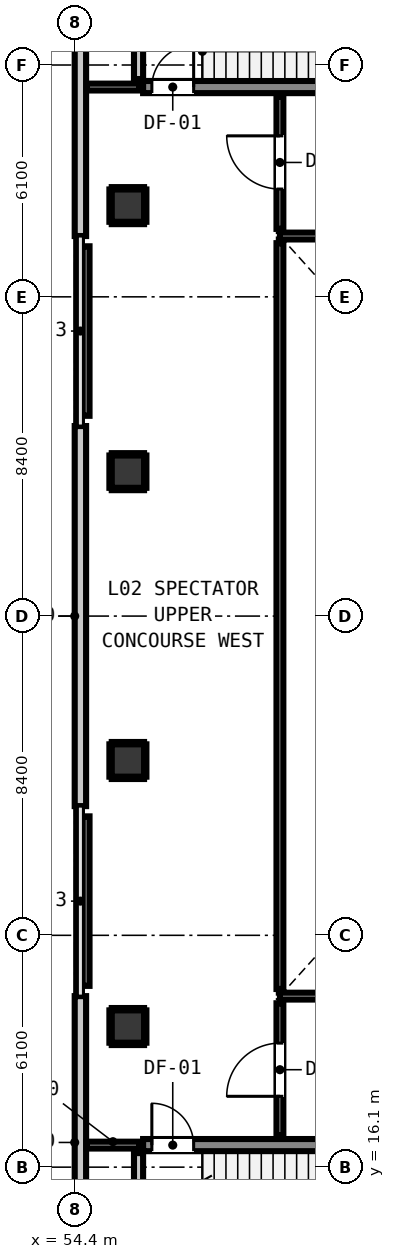
"""IFC4 building model, lengths in metres.
Left out: names, types, materials, properties, quantities, classifications, styles, units other than length and angle.
Written with IfcOpenShell. Run it as: python <this file> out.ifc"""

import sys

from ifc_helpers import new_model, si_unit, direction, frame, frame_2d, origin, origin_2d, place, context, subcontext, project, spatial, rectangle, extrude, element, fill, save


model = new_model("IFC4")
c1 = context("Model", 3, precision=1e-05, world=origin(), true_north=direction((0.0, 1.0)))
c2 = subcontext(c1, "Body", "Model", "MODEL_VIEW")
j1 = project(units=[si_unit("LENGTHUNIT", "METRE"), si_unit("PLANEANGLEUNIT", "RADIAN")], contexts=[c1])
p1 = place(None, origin())
s1 = spatial("IfcSite", under=j1, at=p1, CompositionType="ELEMENT")
p2 = place(p1, origin())
s2 = spatial("IfcBuilding", under=s1, at=p2, CompositionType="ELEMENT")
p3 = place(p2, frame((0.0, 0.0, 9.4)))
s3 = spatial("IfcBuildingStorey", under=s2, at=p3, CompositionType="ELEMENT", Elevation=9.4)
p4 = place(p3, frame((56.2, 16.68, 0.0), z_axis=(0.0, 0.0, 1.0), x_axis=(1.0, 0.0, 0.0)))
e1 = element("IfcWall", 1, at=p4, inside=s3, PredefinedType="SHEAR", context=c2, shape_type="SweptSolid", body=[
    extrude(rectangle(XDim=8.4, YDim=0.32, at=frame_2d((4.2, 0.0))), origin(), (0.0, 0.0, 1.0), 4.2),
])
p5 = place(p4, frame((0.23, 0.0, 0.0)))
e2 = element("IfcOpeningElement", 2, at=p5, cuts=e1, PredefinedType="OPENING", context=c2, shape_type="SweptSolid", body=[
    extrude(rectangle(XDim=1.1, YDim=2.15, at=frame_2d((0.55, 1.075))), frame((0.0, 0.17, 0.0), z_axis=(0.0, -1.0, 0.0), x_axis=(1.0, 0.0, 0.0)), (0.0, 0.0, 1.0), 0.34),
])
p6 = place(p3, frame((56.2, 44.52, 0.0), z_axis=(0.0, 0.0, 1.0), x_axis=(1.0, 0.0, 0.0)))
e3 = element("IfcWall", 3, at=p6, inside=s3, PredefinedType="SHEAR", context=c2, shape_type="SweptSolid", body=[
    extrude(rectangle(XDim=8.4, YDim=0.32, at=frame_2d((4.2, 0.0))), origin(), (0.0, 0.0, 1.0), 4.2),
])
p7 = place(p6, frame((0.23, 0.0, 0.0)))
e4 = element("IfcOpeningElement", 4, at=p7, cuts=e3, PredefinedType="OPENING", context=c2, shape_type="SweptSolid", body=[
    extrude(rectangle(XDim=1.1, YDim=2.15, at=frame_2d((0.55, 1.075))), frame((0.0, 0.17, 0.0), z_axis=(0.0, -1.0, 0.0), x_axis=(1.0, 0.0, 0.0)), (0.0, 0.0, 1.0), 0.34),
])
for number, where, z_axis, x_axis in (
    (5, (55.8, 19.8, 0.0), (0.0, 0.0, 1.0), (1.0, 0.0, 0.0)),
    (6, (55.8, 26.8, 0.0), (0.0, 0.0, 1.0), (1.0, 0.0, 0.0)),
    (7, (55.8, 34.4, 0.0), (0.0, 0.0, 1.0), (1.0, 0.0, 0.0)),
    (8, (55.8, 41.4, 0.0), (0.0, 0.0, 1.0), (1.0, 0.0, 0.0)),
):
    element("IfcColumn", number, at=place(p3, frame(where, z_axis=z_axis, x_axis=x_axis)), inside=s3, PredefinedType="COLUMN", context=c2, shape_type="SweptSolid", body=[
        extrude(rectangle(XDim=0.85, YDim=0.85, at=origin_2d()), origin(), (0.0, 0.0, 1.0), 4.2),
    ])
p8 = place(p3, frame((54.55, 12.9, 0.0), z_axis=(0.0, 0.0, 1.0), x_axis=(0.0, 1.0, 0.0)))
e9 = element("IfcWall", 9, at=p8, inside=s3, PredefinedType="STANDARD", context=c2, shape_type="SweptSolid", body=[
    extrude(rectangle(XDim=7.7, YDim=0.3, at=frame_2d((3.85, 0.0))), origin(), (0.0, 0.0, 1.0), 3.92),
])
p9 = place(p3, frame((54.55, 25.6, 0.0), z_axis=(0.0, 0.0, 1.0), x_axis=(0.0, 1.0, 0.0)))
e10 = element("IfcWall", 10, at=p9, inside=s3, PredefinedType="STANDARD", context=c2, shape_type="SweptSolid", body=[
    extrude(rectangle(XDim=10.0, YDim=0.3, at=frame_2d((5.0, 0.0))), origin(), (0.0, 0.0, 1.0), 3.92),
])
p10 = place(p3, frame((54.55, 40.6, 0.0), z_axis=(0.0, 0.0, 1.0), x_axis=(0.0, 1.0, 0.0)))
e11 = element("IfcWall", 11, at=p10, inside=s3, PredefinedType="STANDARD", context=c2, shape_type="SweptSolid", body=[
    extrude(rectangle(XDim=7.7, YDim=0.3, at=frame_2d((3.85, 0.0))), origin(), (0.0, 0.0, 1.0), 3.92),
])
for number, where, z_axis, x_axis in (
    (12, (56.08, 14.357, 0.0), (0.0, 0.0, 1.0), (0.0, 1.0, 0.0)),
    (13, (56.08, 44.73, 0.0), (0.0, 0.0, 1.0), (0.0, 1.0, 0.0)),
):
    element("IfcWall", number, at=place(p3, frame(where, z_axis=z_axis, x_axis=x_axis)), inside=s3, PredefinedType="PARTITIONING", context=c2, shape_type="SweptSolid", body=[
        extrude(rectangle(XDim=2.113, YDim=0.24, at=frame_2d((1.057, 0.0))), origin(), (0.0, 0.0, 1.0), 3.155),
    ])
p11 = place(p3, frame((54.712, 16.68, 0.0), z_axis=(0.0, 0.0, 1.0), x_axis=(1.0, 0.0, 0.0)))
e14 = element("IfcWall", 14, at=p11, inside=s3, PredefinedType="PARTITIONING", context=c2, shape_type="SweptSolid", body=[
    extrude(rectangle(XDim=1.388, YDim=0.18, at=frame_2d((0.694, 0.0))), origin(), (0.0, 0.0, 1.0), 3.92),
])
for number, where, z_axis, x_axis in (
    (15, (59.8, 20.6, 0.0), (0.0, 0.0, 1.0), (1.0, 0.0, 0.0)),
    (16, (59.8, 40.6, 0.0), (0.0, 0.0, 1.0), (1.0, 0.0, 0.0)),
):
    element("IfcWall", number, at=place(p3, frame(where, z_axis=z_axis, x_axis=x_axis)), inside=s3, PredefinedType="PARTITIONING", context=c2, shape_type="SweptSolid", body=[
        extrude(rectangle(XDim=18.0, YDim=0.18, at=frame_2d((9.0, 0.0))), origin(), (0.0, 0.0, 1.0), 3.92),
    ])
p12 = place(p3, frame((54.712, 44.52, 0.0), z_axis=(0.0, 0.0, 1.0), x_axis=(1.0, 0.0, 0.0)))
e17 = element("IfcWall", 17, at=p12, inside=s3, PredefinedType="PARTITIONING", context=c2, shape_type="SweptSolid", body=[
    extrude(rectangle(XDim=1.388, YDim=0.18, at=frame_2d((0.694, 0.0))), origin(), (0.0, 0.0, 1.0), 3.92),
])
for number, where, z_axis, x_axis in (
    (18, (54.7, 20.87, 0.0), (0.0, 0.0, 1.0), (0.0, 1.0, 0.0)),
    (19, (54.7, 35.87, 0.0), (0.0, 0.0, 1.0), (0.0, 1.0, 0.0)),
):
    element("IfcWall", number, at=place(p3, frame(where, z_axis=z_axis, x_axis=x_axis)), inside=s3, PredefinedType="PARTITIONING", context=c2, shape_type="SweptSolid", body=[
        extrude(rectangle(XDim=4.46, YDim=0.18, at=frame_2d((2.23, 0.0))), origin(), (0.0, 0.0, 1.0), 3.92),
    ])
p13 = place(p3, frame((59.8, 16.94, 0.0), z_axis=(0.0, 0.0, 1.0), x_axis=(0.0, 1.0, 0.0)))
e20 = element("IfcWall", 20, at=p13, inside=s3, PredefinedType="PARTITIONING", context=c2, shape_type="SweptSolid", body=[
    extrude(rectangle(XDim=3.472, YDim=0.18, at=frame_2d((1.736, 0.0))), origin(), (0.0, 0.0, 1.0), 3.92),
])
p14 = place(p13, frame((1.024, 0.0, 0.0)))
e21 = element("IfcOpeningElement", 21, at=p14, cuts=e20, PredefinedType="OPENING", context=c2, shape_type="SweptSolid", body=[
    extrude(rectangle(XDim=1.4, YDim=2.15, at=frame_2d((0.7, 1.075))), frame((0.0, 0.1, 0.0), z_axis=(0.0, -1.0, 0.0), x_axis=(1.0, 0.0, 0.0)), (0.0, 0.0, 1.0), 0.2),
])
p15 = place(p3, frame((59.8, 20.788, 0.0), z_axis=(0.0, 0.0, 1.0), x_axis=(0.0, 1.0, 0.0)))
e22 = element("IfcWall", 22, at=p15, inside=s3, PredefinedType="PARTITIONING", context=c2, shape_type="SweptSolid", body=[
    extrude(rectangle(XDim=19.624, YDim=0.18, at=frame_2d((9.812, 0.0))), origin(), (0.0, 0.0, 1.0), 3.92),
])
p16 = place(p3, frame((59.8, 40.788, 0.0), z_axis=(0.0, 0.0, 1.0), x_axis=(0.0, 1.0, 0.0)))
e23 = element("IfcWall", 23, at=p16, inside=s3, PredefinedType="PARTITIONING", context=c2, shape_type="SweptSolid", body=[
    extrude(rectangle(XDim=3.472, YDim=0.18, at=frame_2d((1.736, 0.0))), origin(), (0.0, 0.0, 1.0), 3.92),
])
p17 = place(p16, frame((1.048, 0.0, 0.0)))
e24 = element("IfcOpeningElement", 24, at=p17, cuts=e23, PredefinedType="OPENING", context=c2, shape_type="SweptSolid", body=[
    extrude(rectangle(XDim=1.4, YDim=2.15, at=frame_2d((0.7, 1.075))), frame((0.0, 0.1, 0.0), z_axis=(0.0, -1.0, 0.0), x_axis=(1.0, 0.0, 0.0)), (0.0, 0.0, 1.0), 0.2),
])
for number, where, z_axis, x_axis in (
    (25, (55.375, 19.343, 0.0), (0.0, 0.0, 1.0), (1.0, 0.0, 0.0)),
    (26, (55.375, 20.257, 0.0), (0.0, 0.0, 1.0), (1.0, 0.0, 0.0)),
    (27, (55.343, 19.375, 0.0), (0.0, 0.0, 1.0), (0.0, 1.0, 0.0)),
    (28, (56.257, 19.375, 0.0), (0.0, 0.0, 1.0), (0.0, 1.0, 0.0)),
    (29, (55.375, 26.343, 0.0), (0.0, 0.0, 1.0), (1.0, 0.0, 0.0)),
    (30, (55.375, 27.257, 0.0), (0.0, 0.0, 1.0), (1.0, 0.0, 0.0)),
    (31, (55.343, 26.375, 0.0), (0.0, 0.0, 1.0), (0.0, 1.0, 0.0)),
    (32, (56.257, 26.375, 0.0), (0.0, 0.0, 1.0), (0.0, 1.0, 0.0)),
    (33, (55.375, 33.943, 0.0), (0.0, 0.0, 1.0), (1.0, 0.0, 0.0)),
    (34, (55.375, 34.857, 0.0), (0.0, 0.0, 1.0), (1.0, 0.0, 0.0)),
):
    element("IfcWall", number, at=place(p3, frame(where, z_axis=z_axis, x_axis=x_axis)), inside=s3, PredefinedType="PARTITIONING", context=c2, shape_type="SweptSolid", body=[
        extrude(rectangle(XDim=0.85, YDim=0.06, at=frame_2d((0.425, 0.0))), origin(), (0.0, 0.0, 1.0), 1.45),
    ])
for number, where, z_axis, x_axis in (
    (35, (55.343, 33.975, 0.0), (0.0, 0.0, 1.0), (0.0, 1.0, 0.0)),
    (36, (56.257, 33.975, 0.0), (0.0, 0.0, 1.0), (0.0, 1.0, 0.0)),
):
    element("IfcWall", number, at=place(p3, frame(where, z_axis=z_axis, x_axis=x_axis)), inside=s3, PredefinedType="PARTITIONING", context=c2, shape_type="SweptSolid", body=[
        extrude(rectangle(XDim=0.85, YDim=0.06, at=frame_2d((0.425, 0.0))), origin(), (0.0, 0.0, 1.0), 1.45),
    ])
for number, where, z_axis, x_axis in (
    (37, (55.375, 40.943, 0.0), (0.0, 0.0, 1.0), (1.0, 0.0, 0.0)),
    (38, (55.375, 41.857, 0.0), (0.0, 0.0, 1.0), (1.0, 0.0, 0.0)),
):
    element("IfcWall", number, at=place(p3, frame(where, z_axis=z_axis, x_axis=x_axis)), inside=s3, PredefinedType="PARTITIONING", context=c2, shape_type="SweptSolid", body=[
        extrude(rectangle(XDim=0.85, YDim=0.06, at=frame_2d((0.425, 0.0))), origin(), (0.0, 0.0, 1.0), 1.45),
    ])
for number, where, z_axis, x_axis in (
    (39, (55.343, 40.975, 0.0), (0.0, 0.0, 1.0), (0.0, 1.0, 0.0)),
    (40, (56.257, 40.975, 0.0), (0.0, 0.0, 1.0), (0.0, 1.0, 0.0)),
):
    element("IfcWall", number, at=place(p3, frame(where, z_axis=z_axis, x_axis=x_axis)), inside=s3, PredefinedType="PARTITIONING", context=c2, shape_type="SweptSolid", body=[
        extrude(rectangle(XDim=0.85, YDim=0.06, at=frame_2d((0.425, 0.0))), origin(), (0.0, 0.0, 1.0), 1.45),
    ])
p18 = place(p5, origin())
e41 = element("IfcDoor", 41, at=p18, inside=s3, OperationType="SINGLE_SWING_LEFT", PredefinedType="DOOR", context=c2, shape_type="SweptSolid", body=[
    extrude(rectangle(XDim=1.1, YDim=2.15, at=frame_2d((0.55, 1.075))), frame((0.0, 0.025, 0.0), z_axis=(0.0, -1.0, 0.0), x_axis=(1.0, 0.0, 0.0)), (0.0, 0.0, 1.0), 0.05),
])
fill(e2, e41)
p19 = place(p7, origin())
e42 = element("IfcDoor", 42, at=p19, inside=s3, OperationType="SINGLE_SWING_RIGHT", PredefinedType="DOOR", context=c2, shape_type="SweptSolid", body=[
    extrude(rectangle(XDim=1.1, YDim=2.15, at=frame_2d((0.55, 1.075))), frame((0.0, 0.025, 0.0), z_axis=(0.0, -1.0, 0.0), x_axis=(1.0, 0.0, 0.0)), (0.0, 0.0, 1.0), 0.05),
])
fill(e4, e42)
p20 = place(p14, origin())
e43 = element("IfcDoor", 43, at=p20, inside=s3, OperationType="SINGLE_SWING_LEFT", PredefinedType="DOOR", context=c2, shape_type="SweptSolid", body=[
    extrude(rectangle(XDim=1.4, YDim=2.15, at=frame_2d((0.7, 1.075))), frame((0.0, 0.025, 0.0), z_axis=(0.0, -1.0, 0.0), x_axis=(1.0, 0.0, 0.0)), (0.0, 0.0, 1.0), 0.05),
])
fill(e21, e43)
p21 = place(p17, origin())
e44 = element("IfcDoor", 44, at=p21, inside=s3, OperationType="SINGLE_SWING_RIGHT", PredefinedType="DOOR", context=c2, shape_type="SweptSolid", body=[
    extrude(rectangle(XDim=1.4, YDim=2.15, at=frame_2d((0.7, 1.075))), frame((0.0, 0.025, 0.0), z_axis=(0.0, -1.0, 0.0), x_axis=(1.0, 0.0, 0.0)), (0.0, 0.0, 1.0), 0.05),
])
fill(e24, e44)
save(model, sys.argv[1])
